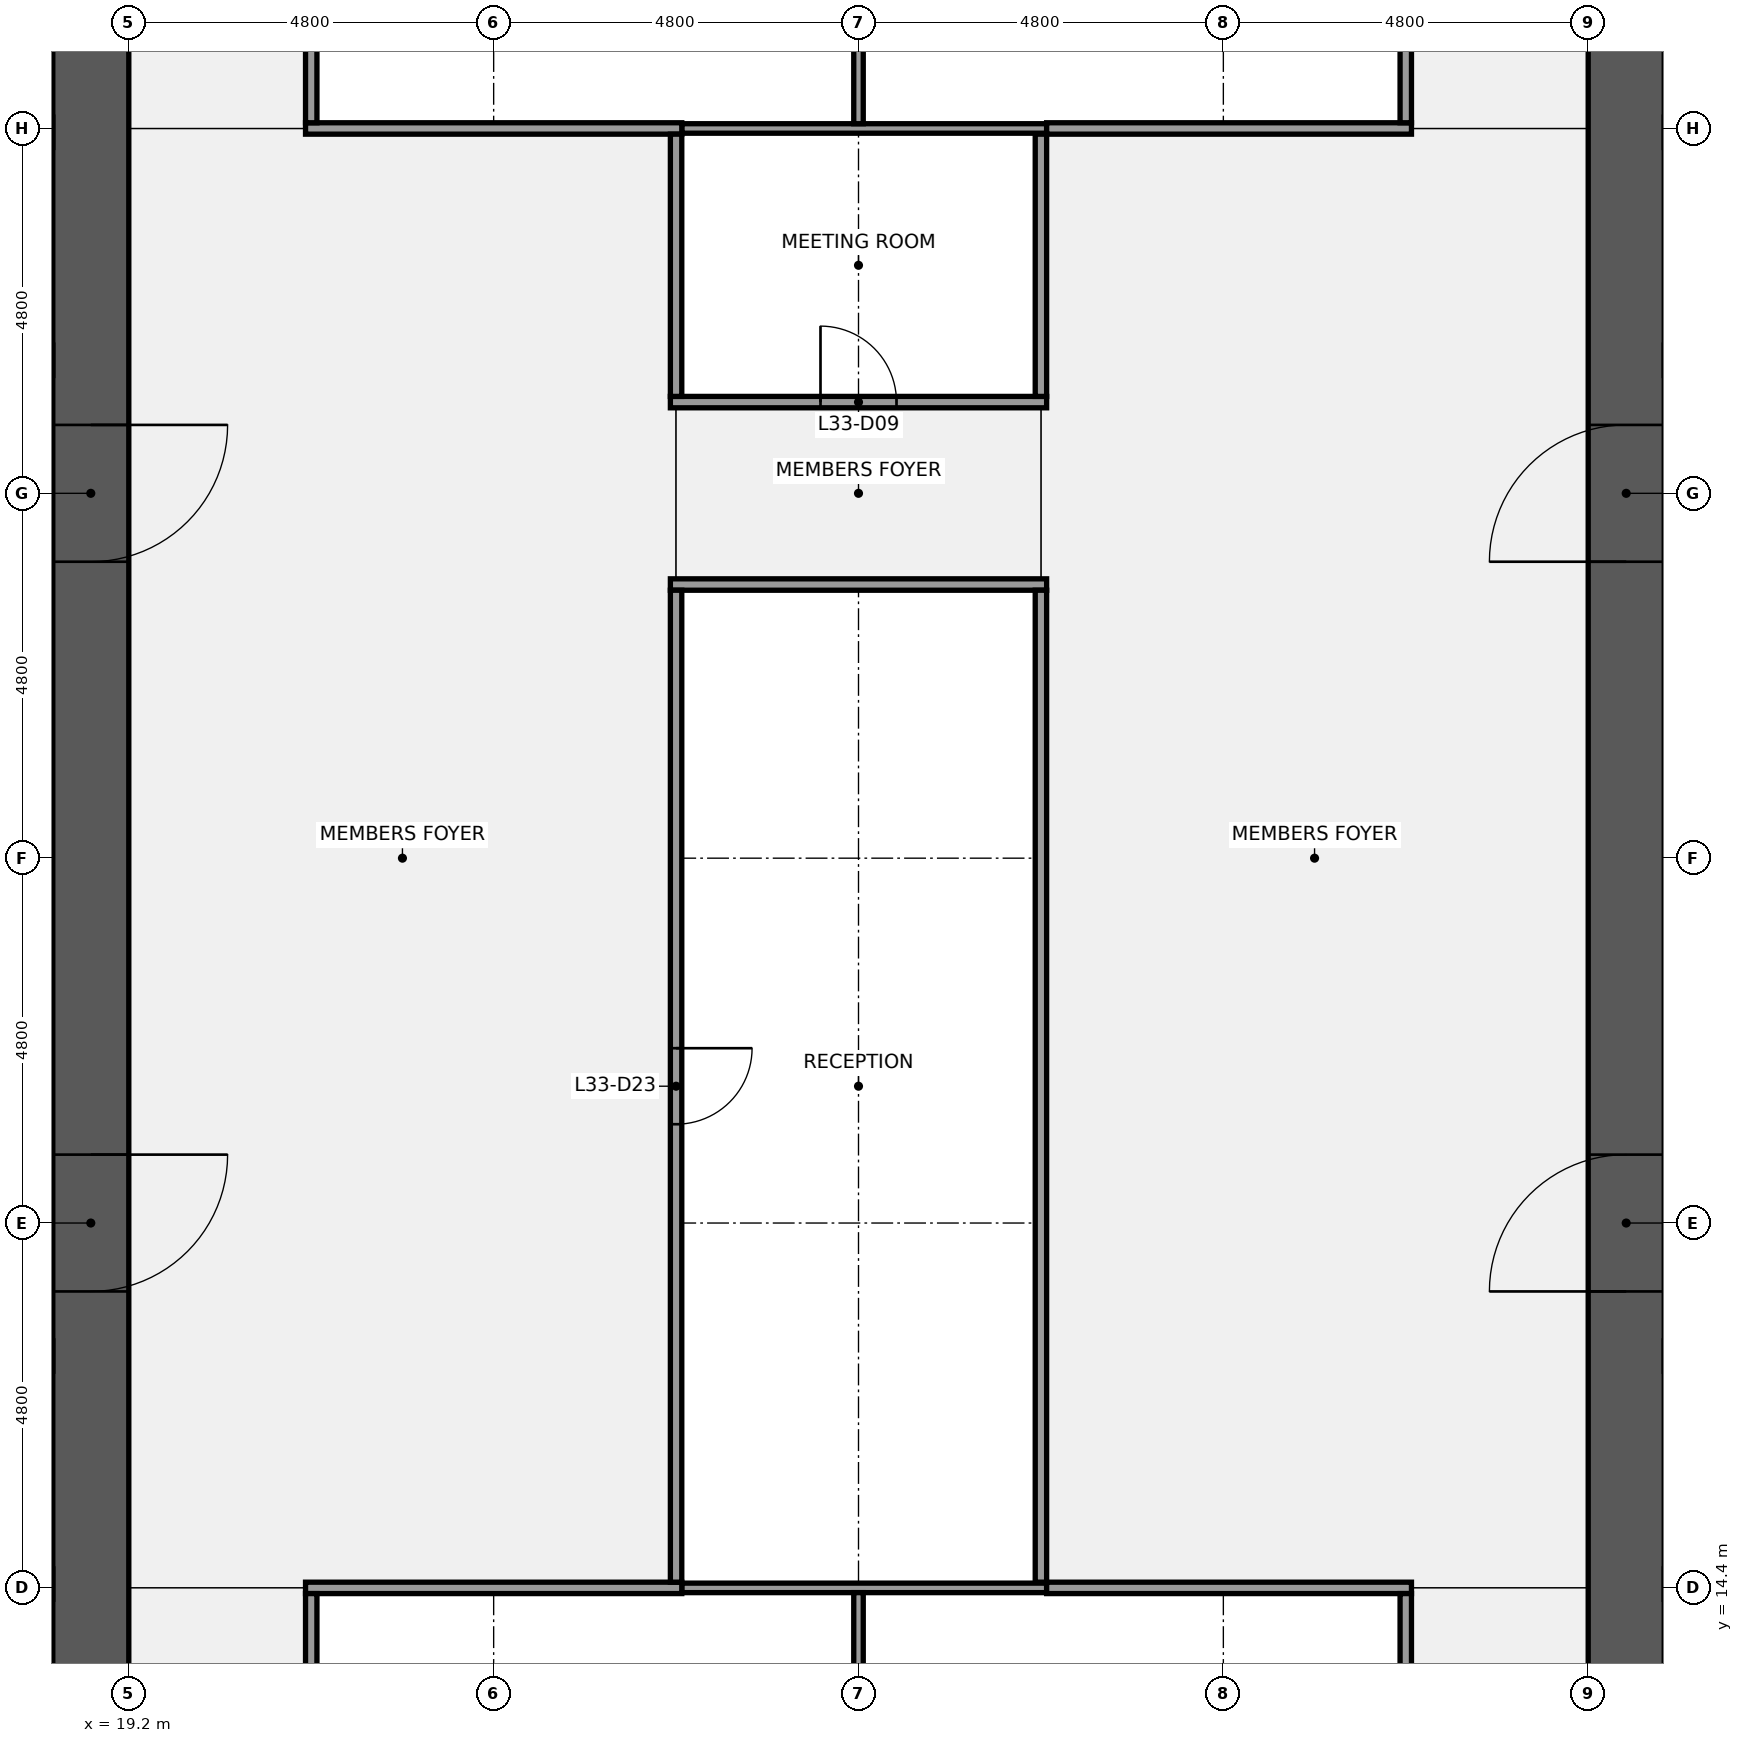
"""IFC4 building model, lengths in metres.
Left out: names, types, materials, properties, quantities, classifications, styles, units other than length and angle.
Written with IfcOpenShell. Run it as: python <this file> out.ifc"""

import sys

from ifc_helpers import new_model, si_unit, direction, frame, frame_2d, origin, place, context, subcontext, project, spatial, rectangle, extrude, element, fill, save


model = new_model("IFC4")
c1 = context("Model", 3, precision=1e-05, world=origin(), true_north=direction((0.0, 1.0)))
c2 = subcontext(c1, "Body", "Model", "MODEL_VIEW")
j1 = project(units=[si_unit("LENGTHUNIT", "METRE"), si_unit("PLANEANGLEUNIT", "RADIAN")], contexts=[c1])
p1 = place(None, origin())
s1 = spatial("IfcSite", under=j1, at=p1, CompositionType="ELEMENT")
p2 = place(p1, origin())
s2 = spatial("IfcBuilding", under=s1, at=p2, CompositionType="ELEMENT")
p3 = place(p2, frame((0.0, 0.0, 152.1)))
s3 = spatial("IfcBuildingStorey", under=s2, at=p3, CompositionType="ELEMENT", Elevation=152.1)
p4 = place(p3, frame((18.7, 38.4, 0.0), z_axis=(0.0, 0.0, 1.0), x_axis=(0.0, -1.0, 0.0)))
e1 = element("IfcWall", 1, at=p4, inside=s3, PredefinedType="SHEAR", context=c2, shape_type="SweptSolid", body=[
    extrude(rectangle(XDim=28.8, YDim=1.0, at=frame_2d((14.4, 0.0))), origin(), (0.0, 0.0, 1.0), 3.84),
])
p5 = place(p4, frame((18.3, 0.0, 0.0)))
e2 = element("IfcOpeningElement", 2, at=p5, cuts=e1, PredefinedType="OPENING", context=c2, shape_type="SweptSolid", body=[
    extrude(rectangle(XDim=1.8, YDim=2.1, at=frame_2d((0.9, 1.05))), frame((0.0, 0.51, 0.0), z_axis=(0.0, -1.0, 0.0), x_axis=(1.0, 0.0, 0.0)), (0.0, 0.0, 1.0), 1.02),
])
p6 = place(p4, frame((8.7, 0.0, 0.0)))
e3 = element("IfcOpeningElement", 3, at=p6, cuts=e1, PredefinedType="OPENING", context=c2, shape_type="SweptSolid", body=[
    extrude(rectangle(XDim=1.8, YDim=2.1, at=frame_2d((0.9, 1.05))), frame((0.0, 0.51, 0.0), z_axis=(0.0, -1.0, 0.0), x_axis=(1.0, 0.0, 0.0)), (0.0, 0.0, 1.0), 1.02),
])
p7 = place(p3, frame((1.0, 14.45, 0.0), z_axis=(0.0, 0.0, 1.0), x_axis=(1.0, 0.0, 0.0)))
e4 = element("IfcWall", 4, at=p7, inside=s3, PredefinedType="SHEAR", context=c2, shape_type="SweptSolid", body=[
    extrude(rectangle(XDim=17.2, YDim=0.4, at=frame_2d((8.6, 0.0))), origin(), (0.0, 0.0, 1.0), 3.84),
])
p8 = place(p3, frame((1.0, 17.45, 0.0), z_axis=(0.0, 0.0, 1.0), x_axis=(1.0, 0.0, 0.0)))
e5 = element("IfcWall", 5, at=p8, inside=s3, PredefinedType="SHEAR", context=c2, shape_type="SweptSolid", body=[
    extrude(rectangle(XDim=17.2, YDim=0.4, at=frame_2d((8.6, 0.0))), origin(), (0.0, 0.0, 1.0), 3.84),
])
p9 = place(p8, frame((0.762, 0.0, 0.0)))
e6 = element("IfcOpeningElement", 6, at=p9, cuts=e5, PredefinedType="OPENING", context=c2, shape_type="SweptSolid", body=[
    extrude(rectangle(XDim=1.0, YDim=2.1, at=frame_2d((0.5, 1.05))), frame((0.0, 0.21, 0.0), z_axis=(0.0, -1.0, 0.0), x_axis=(1.0, 0.0, 0.0)), (0.0, 0.0, 1.0), 0.42),
])
p10 = place(p8, frame((3.3, 0.0, 0.0)))
e7 = element("IfcOpeningElement", 7, at=p10, cuts=e5, PredefinedType="OPENING", context=c2, shape_type="SweptSolid", body=[
    extrude(rectangle(XDim=1.0, YDim=2.1, at=frame_2d((0.5, 1.05))), frame((0.0, 0.21, 0.0), z_axis=(0.0, -1.0, 0.0), x_axis=(1.0, 0.0, 0.0)), (0.0, 0.0, 1.0), 0.42),
])
p11 = place(p8, frame((7.5, 0.0, 0.0)))
e8 = element("IfcOpeningElement", 8, at=p11, cuts=e5, PredefinedType="OPENING", context=c2, shape_type="SweptSolid", body=[
    extrude(rectangle(XDim=1.0, YDim=2.1, at=frame_2d((0.5, 1.05))), frame((0.0, 0.21, 0.0), z_axis=(0.0, -1.0, 0.0), x_axis=(1.0, 0.0, 0.0)), (0.0, 0.0, 1.0), 0.42),
])
p12 = place(p8, frame((12.0, 0.0, 0.0)))
e9 = element("IfcOpeningElement", 9, at=p12, cuts=e5, PredefinedType="OPENING", context=c2, shape_type="SweptSolid", body=[
    extrude(rectangle(XDim=1.0, YDim=2.1, at=frame_2d((0.5, 1.05))), frame((0.0, 0.21, 0.0), z_axis=(0.0, -1.0, 0.0), x_axis=(1.0, 0.0, 0.0)), (0.0, 0.0, 1.0), 0.42),
])
p13 = place(p8, frame((15.137, 0.0, 0.0)))
e10 = element("IfcOpeningElement", 10, at=p13, cuts=e5, PredefinedType="OPENING", context=c2, shape_type="SweptSolid", body=[
    extrude(rectangle(XDim=1.0, YDim=2.1, at=frame_2d((0.5, 1.05))), frame((0.0, 0.21, 0.0), z_axis=(0.0, -1.0, 0.0), x_axis=(1.0, 0.0, 0.0)), (0.0, 0.0, 1.0), 0.42),
])
p14 = place(p3, frame((1.0, 30.55, 0.0), z_axis=(0.0, 0.0, 1.0), x_axis=(1.0, 0.0, 0.0)))
e11 = element("IfcWall", 11, at=p14, inside=s3, PredefinedType="SHEAR", context=c2, shape_type="SweptSolid", body=[
    extrude(rectangle(XDim=17.2, YDim=0.4, at=frame_2d((8.6, 0.0))), origin(), (0.0, 0.0, 1.0), 3.84),
])
p15 = place(p14, frame((0.762, 0.0, 0.0)))
e12 = element("IfcOpeningElement", 12, at=p15, cuts=e11, PredefinedType="OPENING", context=c2, shape_type="SweptSolid", body=[
    extrude(rectangle(XDim=1.0, YDim=2.1, at=frame_2d((0.5, 1.05))), frame((0.0, 0.21, 0.0), z_axis=(0.0, -1.0, 0.0), x_axis=(1.0, 0.0, 0.0)), (0.0, 0.0, 1.0), 0.42),
])
p16 = place(p14, frame((3.3, 0.0, 0.0)))
e13 = element("IfcOpeningElement", 13, at=p16, cuts=e11, PredefinedType="OPENING", context=c2, shape_type="SweptSolid", body=[
    extrude(rectangle(XDim=1.0, YDim=2.1, at=frame_2d((0.5, 1.05))), frame((0.0, 0.21, 0.0), z_axis=(0.0, -1.0, 0.0), x_axis=(1.0, 0.0, 0.0)), (0.0, 0.0, 1.0), 0.42),
])
p17 = place(p14, frame((7.5, 0.0, 0.0)))
e14 = element("IfcOpeningElement", 14, at=p17, cuts=e11, PredefinedType="OPENING", context=c2, shape_type="SweptSolid", body=[
    extrude(rectangle(XDim=1.0, YDim=2.1, at=frame_2d((0.5, 1.05))), frame((0.0, 0.21, 0.0), z_axis=(0.0, -1.0, 0.0), x_axis=(1.0, 0.0, 0.0)), (0.0, 0.0, 1.0), 0.42),
])
p18 = place(p14, frame((12.0, 0.0, 0.0)))
e15 = element("IfcOpeningElement", 15, at=p18, cuts=e11, PredefinedType="OPENING", context=c2, shape_type="SweptSolid", body=[
    extrude(rectangle(XDim=1.0, YDim=2.1, at=frame_2d((0.5, 1.05))), frame((0.0, 0.21, 0.0), z_axis=(0.0, -1.0, 0.0), x_axis=(1.0, 0.0, 0.0)), (0.0, 0.0, 1.0), 0.42),
])
p19 = place(p14, frame((15.137, 0.0, 0.0)))
e16 = element("IfcOpeningElement", 16, at=p19, cuts=e11, PredefinedType="OPENING", context=c2, shape_type="SweptSolid", body=[
    extrude(rectangle(XDim=1.0, YDim=2.1, at=frame_2d((0.5, 1.05))), frame((0.0, 0.21, 0.0), z_axis=(0.0, -1.0, 0.0), x_axis=(1.0, 0.0, 0.0)), (0.0, 0.0, 1.0), 0.42),
])
p20 = place(p3, frame((1.0, 33.55, 0.0), z_axis=(0.0, 0.0, 1.0), x_axis=(1.0, 0.0, 0.0)))
e17 = element("IfcWall", 17, at=p20, inside=s3, PredefinedType="SHEAR", context=c2, shape_type="SweptSolid", body=[
    extrude(rectangle(XDim=17.2, YDim=0.4, at=frame_2d((8.6, 0.0))), origin(), (0.0, 0.0, 1.0), 3.84),
])
p21 = place(p3, frame((38.9, 9.6, 0.0), z_axis=(0.0, 0.0, 1.0), x_axis=(0.0, 1.0, 0.0)))
e18 = element("IfcWall", 18, at=p21, inside=s3, PredefinedType="SHEAR", context=c2, shape_type="SweptSolid", body=[
    extrude(rectangle(XDim=28.8, YDim=1.0, at=frame_2d((14.4, 0.0))), origin(), (0.0, 0.0, 1.0), 3.84),
])
p22 = place(p21, frame((8.7, 0.0, 0.0)))
e19 = element("IfcOpeningElement", 19, at=p22, cuts=e18, PredefinedType="OPENING", context=c2, shape_type="SweptSolid", body=[
    extrude(rectangle(XDim=1.8, YDim=2.1, at=frame_2d((0.9, 1.05))), frame((0.0, 0.51, 0.0), z_axis=(0.0, -1.0, 0.0), x_axis=(1.0, 0.0, 0.0)), (0.0, 0.0, 1.0), 1.02),
])
p23 = place(p21, frame((18.3, 0.0, 0.0)))
e20 = element("IfcOpeningElement", 20, at=p23, cuts=e18, PredefinedType="OPENING", context=c2, shape_type="SweptSolid", body=[
    extrude(rectangle(XDim=1.8, YDim=2.1, at=frame_2d((0.9, 1.05))), frame((0.0, 0.51, 0.0), z_axis=(0.0, -1.0, 0.0), x_axis=(1.0, 0.0, 0.0)), (0.0, 0.0, 1.0), 1.02),
])
p24 = place(p3, frame((26.475, 14.4, 0.0), z_axis=(0.0, 0.0, 1.0), x_axis=(1.0, 0.0, 0.0)))
e21 = element("IfcWall", 21, at=p24, inside=s3, PredefinedType="PARTITIONING", context=c2, shape_type="SweptSolid", body=[
    extrude(rectangle(XDim=4.8, YDim=0.125, at=frame_2d((2.4, 0.0))), origin(), (0.0, 0.0, 1.0), 2.936),
])
p25 = place(p3, frame((21.525, 14.4, 0.0), z_axis=(0.0, 0.0, 1.0), x_axis=(1.0, 0.0, 0.0)))
e22 = element("IfcWall", 22, at=p25, inside=s3, PredefinedType="PARTITIONING", context=c2, shape_type="SweptSolid", body=[
    extrude(rectangle(XDim=4.95, YDim=0.15, at=frame_2d((2.475, 0.0))), origin(), (0.0, 0.0, 1.0), 2.936),
])
p26 = place(p3, frame((31.275, 14.4, 0.0), z_axis=(0.0, 0.0, 1.0), x_axis=(1.0, 0.0, 0.0)))
e23 = element("IfcWall", 23, at=p26, inside=s3, PredefinedType="PARTITIONING", context=c2, shape_type="SweptSolid", body=[
    extrude(rectangle(XDim=4.8, YDim=0.15, at=frame_2d((2.4, 0.0))), origin(), (0.0, 0.0, 1.0), 2.936),
])
p27 = place(p3, frame((26.325, 27.6, 0.0), z_axis=(0.0, 0.0, 1.0), x_axis=(1.0, 0.0, 0.0)))
e24 = element("IfcWall", 24, at=p27, inside=s3, PredefinedType="PARTITIONING", context=c2, shape_type="SweptSolid", body=[
    extrude(rectangle(XDim=4.95, YDim=0.15, at=frame_2d((2.475, 0.0))), origin(), (0.0, 0.0, 1.0), 2.936),
])
p28 = place(p3, frame((26.325, 30.0, 0.0), z_axis=(0.0, 0.0, 1.0), x_axis=(1.0, 0.0, 0.0)))
e25 = element("IfcWall", 25, at=p28, inside=s3, PredefinedType="PARTITIONING", context=c2, shape_type="SweptSolid", body=[
    extrude(rectangle(XDim=4.95, YDim=0.15, at=frame_2d((2.475, 0.0))), origin(), (0.0, 0.0, 1.0), 2.936),
])
p29 = place(p28, frame((1.975, 0.0, 0.0)))
e26 = element("IfcOpeningElement", 26, at=p29, cuts=e25, PredefinedType="OPENING", context=c2, shape_type="SweptSolid", body=[
    extrude(rectangle(XDim=1.0, YDim=2.1, at=frame_2d((0.5, 1.05))), frame((0.0, 0.085, 0.0), z_axis=(0.0, -1.0, 0.0), x_axis=(1.0, 0.0, 0.0)), (0.0, 0.0, 1.0), 0.17),
])
p30 = place(p3, frame((26.475, 33.6, 0.0), z_axis=(0.0, 0.0, 1.0), x_axis=(1.0, 0.0, 0.0)))
e27 = element("IfcWall", 27, at=p30, inside=s3, PredefinedType="PARTITIONING", context=c2, shape_type="SweptSolid", body=[
    extrude(rectangle(XDim=4.8, YDim=0.125, at=frame_2d((2.4, 0.0))), origin(), (0.0, 0.0, 1.0), 2.936),
])
p31 = place(p3, frame((21.525, 33.6, 0.0), z_axis=(0.0, 0.0, 1.0), x_axis=(1.0, 0.0, 0.0)))
e28 = element("IfcWall", 28, at=p31, inside=s3, PredefinedType="PARTITIONING", context=c2, shape_type="SweptSolid", body=[
    extrude(rectangle(XDim=4.95, YDim=0.15, at=frame_2d((2.475, 0.0))), origin(), (0.0, 0.0, 1.0), 2.936),
])
p32 = place(p3, frame((31.275, 33.6, 0.0), z_axis=(0.0, 0.0, 1.0), x_axis=(1.0, 0.0, 0.0)))
e29 = element("IfcWall", 29, at=p32, inside=s3, PredefinedType="PARTITIONING", context=c2, shape_type="SweptSolid", body=[
    extrude(rectangle(XDim=4.8, YDim=0.15, at=frame_2d((2.4, 0.0))), origin(), (0.0, 0.0, 1.0), 2.936),
])
for number, where, z_axis, x_axis in (
    (30, (21.6, 9.675, 0.0), (0.0, 0.0, 1.0), (0.0, 1.0, 0.0)),
    (31, (21.6, 33.675, 0.0), (0.0, 0.0, 1.0), (0.0, 1.0, 0.0)),
):
    element("IfcWall", number, at=place(p3, frame(where, z_axis=z_axis, x_axis=x_axis)), inside=s3, PredefinedType="PARTITIONING", context=c2, shape_type="SweptSolid", body=[
        extrude(rectangle(XDim=4.65, YDim=0.15, at=frame_2d((2.325, 0.0))), origin(), (0.0, 0.0, 1.0), 2.936),
    ])
p33 = place(p3, frame((26.4, 14.475, 0.0), z_axis=(0.0, 0.0, 1.0), x_axis=(0.0, 1.0, 0.0)))
e32 = element("IfcWall", 32, at=p33, inside=s3, PredefinedType="PARTITIONING", context=c2, shape_type="SweptSolid", body=[
    extrude(rectangle(XDim=13.05, YDim=0.15, at=frame_2d((6.525, 0.0))), origin(), (0.0, 0.0, 1.0), 2.936),
])
p34 = place(p33, frame((6.025, 0.0, 0.0)))
e33 = element("IfcOpeningElement", 33, at=p34, cuts=e32, PredefinedType="OPENING", context=c2, shape_type="SweptSolid", body=[
    extrude(rectangle(XDim=1.0, YDim=2.1, at=frame_2d((0.5, 1.05))), frame((0.0, 0.085, 0.0), z_axis=(0.0, -1.0, 0.0), x_axis=(1.0, 0.0, 0.0)), (0.0, 0.0, 1.0), 0.17),
])
p35 = place(p3, frame((26.4, 30.075, 0.0), z_axis=(0.0, 0.0, 1.0), x_axis=(0.0, 1.0, 0.0)))
e34 = element("IfcWall", 34, at=p35, inside=s3, PredefinedType="PARTITIONING", context=c2, shape_type="SweptSolid", body=[
    extrude(rectangle(XDim=3.45, YDim=0.15, at=frame_2d((1.725, 0.0))), origin(), (0.0, 0.0, 1.0), 2.936),
])
for number, where, z_axis, x_axis in (
    (35, (28.8, 9.675, 0.0), (0.0, 0.0, 1.0), (0.0, 1.0, 0.0)),
    (36, (28.8, 33.663, 0.0), (0.0, 0.0, 1.0), (0.0, 1.0, 0.0)),
):
    element("IfcWall", number, at=place(p3, frame(where, z_axis=z_axis, x_axis=x_axis)), inside=s3, PredefinedType="PARTITIONING", context=c2, shape_type="SweptSolid", body=[
        extrude(rectangle(XDim=4.662, YDim=0.125, at=frame_2d((2.331, 0.0))), origin(), (0.0, 0.0, 1.0), 2.936),
    ])
p36 = place(p3, frame((31.2, 14.475, 0.0), z_axis=(0.0, 0.0, 1.0), x_axis=(0.0, 1.0, 0.0)))
e37 = element("IfcWall", 37, at=p36, inside=s3, PredefinedType="PARTITIONING", context=c2, shape_type="SweptSolid", body=[
    extrude(rectangle(XDim=13.05, YDim=0.15, at=frame_2d((6.525, 0.0))), origin(), (0.0, 0.0, 1.0), 2.936),
])
p37 = place(p3, frame((31.2, 30.075, 0.0), z_axis=(0.0, 0.0, 1.0), x_axis=(0.0, 1.0, 0.0)))
e38 = element("IfcWall", 38, at=p37, inside=s3, PredefinedType="PARTITIONING", context=c2, shape_type="SweptSolid", body=[
    extrude(rectangle(XDim=3.45, YDim=0.15, at=frame_2d((1.725, 0.0))), origin(), (0.0, 0.0, 1.0), 2.936),
])
for number, where, z_axis, x_axis in (
    (39, (36.0, 9.675, 0.0), (0.0, 0.0, 1.0), (0.0, 1.0, 0.0)),
    (40, (36.0, 33.675, 0.0), (0.0, 0.0, 1.0), (0.0, 1.0, 0.0)),
):
    element("IfcWall", number, at=place(p3, frame(where, z_axis=z_axis, x_axis=x_axis)), inside=s3, PredefinedType="PARTITIONING", context=c2, shape_type="SweptSolid", body=[
        extrude(rectangle(XDim=4.65, YDim=0.15, at=frame_2d((2.325, 0.0))), origin(), (0.0, 0.0, 1.0), 2.936),
    ])
p38 = place(p5, origin())
e41 = element("IfcDoor", 41, at=p38, inside=s3, OperationType="DOUBLE_DOOR_SINGLE_SWING", PredefinedType="DOOR", context=c2, shape_type="SweptSolid", body=[
    extrude(rectangle(XDim=1.8, YDim=2.1, at=frame_2d((0.9, 1.05))), frame((0.0, 0.025, 0.0), z_axis=(0.0, -1.0, 0.0), x_axis=(1.0, 0.0, 0.0)), (0.0, 0.0, 1.0), 0.05),
])
fill(e2, e41)
p39 = place(p6, origin())
e42 = element("IfcDoor", 42, at=p39, inside=s3, OperationType="DOUBLE_DOOR_SINGLE_SWING", PredefinedType="DOOR", context=c2, shape_type="SweptSolid", body=[
    extrude(rectangle(XDim=1.8, YDim=2.1, at=frame_2d((0.9, 1.05))), frame((0.0, 0.025, 0.0), z_axis=(0.0, -1.0, 0.0), x_axis=(1.0, 0.0, 0.0)), (0.0, 0.0, 1.0), 0.05),
])
fill(e3, e42)
p40 = place(p22, origin())
e43 = element("IfcDoor", 43, at=p40, inside=s3, OperationType="DOUBLE_DOOR_SINGLE_SWING", PredefinedType="DOOR", context=c2, shape_type="SweptSolid", body=[
    extrude(rectangle(XDim=1.8, YDim=2.1, at=frame_2d((0.9, 1.05))), frame((0.0, 0.025, 0.0), z_axis=(0.0, -1.0, 0.0), x_axis=(1.0, 0.0, 0.0)), (0.0, 0.0, 1.0), 0.05),
])
fill(e19, e43)
p41 = place(p23, origin())
e44 = element("IfcDoor", 44, at=p41, inside=s3, OperationType="DOUBLE_DOOR_SINGLE_SWING", PredefinedType="DOOR", context=c2, shape_type="SweptSolid", body=[
    extrude(rectangle(XDim=1.8, YDim=2.1, at=frame_2d((0.9, 1.05))), frame((0.0, 0.025, 0.0), z_axis=(0.0, -1.0, 0.0), x_axis=(1.0, 0.0, 0.0)), (0.0, 0.0, 1.0), 0.05),
])
fill(e20, e44)
p42 = place(p29, origin())
e45 = element("IfcDoor", 45, at=p42, inside=s3, OperationType="SINGLE_SWING_LEFT", PredefinedType="DOOR", context=c2, shape_type="SweptSolid", body=[
    extrude(rectangle(XDim=1.0, YDim=2.1, at=frame_2d((0.5, 1.05))), frame((0.0, 0.025, 0.0), z_axis=(0.0, -1.0, 0.0), x_axis=(1.0, 0.0, 0.0)), (0.0, 0.0, 1.0), 0.05),
])
fill(e26, e45)
p43 = place(p34, origin())
e46 = element("IfcDoor", 46, at=p43, inside=s3, OperationType="SINGLE_SWING_RIGHT", PredefinedType="DOOR", context=c2, shape_type="SweptSolid", body=[
    extrude(rectangle(XDim=1.0, YDim=2.1, at=frame_2d((0.5, 1.05))), frame((0.0, 0.025, 0.0), z_axis=(0.0, -1.0, 0.0), x_axis=(1.0, 0.0, 0.0)), (0.0, 0.0, 1.0), 0.05),
])
fill(e33, e46)
save(model, sys.argv[1])
